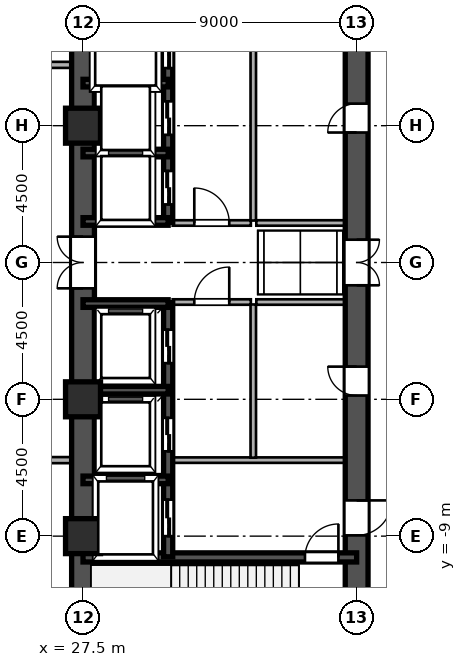
"""IFC4 building model, lengths in metres.
Left out: names, types, materials, properties, quantities, classifications, styles, units other than length and angle.
Written with IfcOpenShell. Run it as: python <this file> out.ifc"""

import sys

from ifc_helpers import new_model, si_unit, direction, frame, frame_2d, origin, origin_2d, place, context, subcontext, project, spatial, rectangle, hollow_rectangle, extrude, source, transform, mapped, element, fill, save


model = new_model("IFC4")
c1 = context("Model", 3, precision=1e-05, world=origin(), true_north=direction((0.0, 1.0)))
c2 = subcontext(c1, "Body", "Model", "MODEL_VIEW")
j1 = project(units=[si_unit("LENGTHUNIT", "METRE"), si_unit("PLANEANGLEUNIT", "RADIAN")], contexts=[c1])
p1 = place(None, origin())
s1 = spatial("IfcSite", under=j1, at=p1, CompositionType="ELEMENT")
p2 = place(p1, origin())
s2 = spatial("IfcBuilding", under=s1, at=p2, CompositionType="ELEMENT")
p3 = place(p2, origin())
s3 = spatial("IfcBuildingStorey", under=s2, at=p3, CompositionType="ELEMENT", Elevation=0.0)
m1 = source(origin(), c2, "Body", "SweptSolid", [
    extrude(hollow_rectangle(XDim=1.15, YDim=1.15, WallThickness=0.048, at=origin_2d()), origin(), (0.0, 0.0, 1.0), 5.4),
])
for number, where, z_axis, x_axis in (
    (1, (27.5, -9.0, 0.0), (0.0, 0.0, 1.0), (1.0, 0.0, 0.0)),
    (2, (27.5, -4.5, 0.0), (0.0, 0.0, 1.0), (1.0, 0.0, 0.0)),
    (3, (27.5, 4.5, 0.0), (0.0, 0.0, 1.0), (1.0, 0.0, 0.0)),
):
    element("IfcColumn", number, at=place(p3, frame(where, z_axis=z_axis, x_axis=x_axis)), inside=s3, PredefinedType="COLUMN", context=c2, shape_type="MappedRepresentation", body=[
        mapped(m1, transform((0.0, 0.0, 0.0), scale=1.0)),
    ])
for number, where, z_axis, x_axis in (
    (4, (27.5, -13.5, 0.0), (0.0, 0.0, 1.0), (0.0, 1.0, 0.0)),
    (5, (27.5, 1.3, 0.0), (0.0, 0.0, 1.0), (0.0, 1.0, 0.0)),
):
    element("IfcWall", number, at=place(p3, frame(where, z_axis=z_axis, x_axis=x_axis)), inside=s3, PredefinedType="SHEAR", context=c2, shape_type="SweptSolid", body=[
        extrude(rectangle(XDim=12.2, YDim=0.75, at=frame_2d((6.1, 0.0))), origin(), (0.0, 0.0, 1.0), 5.12),
    ])
p4 = place(p3, frame((27.5, -1.3, 0.0), z_axis=(0.0, 0.0, 1.0), x_axis=(0.0, 1.0, 0.0)))
e6 = element("IfcWall", 6, at=p4, inside=s3, PredefinedType="SHEAR", context=c2, shape_type="SweptSolid", body=[
    extrude(rectangle(XDim=2.6, YDim=0.75, at=frame_2d((1.3, 0.0))), origin(), (0.0, 0.0, 1.0), 5.12),
])
p5 = place(p4, frame((0.45, 0.0, 0.0)))
e7 = element("IfcOpeningElement", 7, at=p5, cuts=e6, PredefinedType="OPENING", context=c2, shape_type="SweptSolid", body=[
    extrude(rectangle(XDim=1.7, YDim=2.35, at=frame_2d((0.85, 1.175))), frame((0.0, 0.385, 0.0), z_axis=(0.0, -1.0, 0.0), x_axis=(1.0, 0.0, 0.0)), (0.0, 0.0, 1.0), 0.77),
])
p6 = place(p3, frame((36.5, -13.65, 0.0), z_axis=(0.0, 0.0, 1.0), x_axis=(0.0, 1.0, 0.0)))
e8 = element("IfcWall", 8, at=p6, inside=s3, PredefinedType="SHEAR", context=c2, shape_type="SweptSolid", body=[
    extrude(rectangle(XDim=7.15, YDim=0.75, at=frame_2d((3.575, 0.0))), origin(), (0.0, 0.0, 1.0), 5.12),
])
p7 = place(p6, frame((4.675, 0.0, 0.0)))
e9 = element("IfcOpeningElement", 9, at=p7, cuts=e8, PredefinedType="OPENING", context=c2, shape_type="SweptSolid", body=[
    extrude(rectangle(XDim=1.15, YDim=2.2, at=frame_2d((0.575, 1.1))), frame((0.0, 0.385, 0.0), z_axis=(0.0, -1.0, 0.0), x_axis=(1.0, 0.0, 0.0)), (0.0, 0.0, 1.0), 0.77),
])
p8 = place(p3, frame((36.5, -1.3, 0.0), z_axis=(0.0, 0.0, 1.0), x_axis=(0.0, 1.0, 0.0)))
e10 = element("IfcWall", 10, at=p8, inside=s3, PredefinedType="SHEAR", context=c2, shape_type="SweptSolid", body=[
    extrude(rectangle(XDim=2.6, YDim=0.75, at=frame_2d((1.3, 0.0))), origin(), (0.0, 0.0, 1.0), 5.12),
])
p9 = place(p8, frame((0.55, 0.0, 0.0)))
e11 = element("IfcOpeningElement", 11, at=p9, cuts=e10, PredefinedType="OPENING", context=c2, shape_type="SweptSolid", body=[
    extrude(rectangle(XDim=1.5, YDim=2.3, at=frame_2d((0.75, 1.15))), frame((0.0, 0.385, 0.0), z_axis=(0.0, -1.0, 0.0), x_axis=(1.0, 0.0, 0.0)), (0.0, 0.0, 1.0), 0.77),
])
p10 = place(p3, frame((36.5, -6.5, 0.0), z_axis=(0.0, 0.0, 1.0), x_axis=(0.0, 1.0, 0.0)))
e12 = element("IfcWall", 12, at=p10, inside=s3, PredefinedType="SHEAR", context=c2, shape_type="SweptSolid", body=[
    extrude(rectangle(XDim=5.2, YDim=0.75, at=frame_2d((2.6, 0.0))), origin(), (0.0, 0.0, 1.0), 5.12),
])
p11 = place(p10, frame((2.125, 0.0, 0.0)))
e13 = element("IfcOpeningElement", 13, at=p11, cuts=e12, PredefinedType="OPENING", context=c2, shape_type="SweptSolid", body=[
    extrude(rectangle(XDim=0.95, YDim=2.15, at=frame_2d((0.475, 1.075))), frame((0.0, 0.385, 0.0), z_axis=(0.0, -1.0, 0.0), x_axis=(1.0, 0.0, 0.0)), (0.0, 0.0, 1.0), 0.77),
])
p12 = place(p3, frame((36.5, 1.3, 0.0), z_axis=(0.0, 0.0, 1.0), x_axis=(0.0, 1.0, 0.0)))
e14 = element("IfcWall", 14, at=p12, inside=s3, PredefinedType="SHEAR", context=c2, shape_type="SweptSolid", body=[
    extrude(rectangle(XDim=6.9, YDim=0.75, at=frame_2d((3.45, 0.0))), origin(), (0.0, 0.0, 1.0), 5.12),
])
p13 = place(p12, frame((2.975, 0.0, 0.0)))
e15 = element("IfcOpeningElement", 15, at=p13, cuts=e14, PredefinedType="OPENING", context=c2, shape_type="SweptSolid", body=[
    extrude(rectangle(XDim=0.95, YDim=2.15, at=frame_2d((0.475, 1.075))), frame((0.0, 0.385, 0.0), z_axis=(0.0, -1.0, 0.0), x_axis=(1.0, 0.0, 0.0)), (0.0, 0.0, 1.0), 0.77),
])
p14 = place(p3, frame((27.5, -9.7, 0.0), z_axis=(0.0, 0.0, 1.0), x_axis=(1.0, 0.0, 0.0)))
e16 = element("IfcWall", 16, at=p14, inside=s3, PredefinedType="SHEAR", context=c2, shape_type="SweptSolid", body=[
    extrude(rectangle(XDim=9.0, YDim=0.3, at=frame_2d((4.5, 0.0))), origin(), (0.0, 0.0, 1.0), 5.12),
])
p15 = place(p14, frame((7.3, 0.0, 0.0)))
e17 = element("IfcOpeningElement", 17, at=p15, cuts=e16, PredefinedType="OPENING", context=c2, shape_type="SweptSolid", body=[
    extrude(rectangle(XDim=1.1, YDim=2.2, at=frame_2d((0.55, 1.1))), frame((0.0, 0.16, 0.0), z_axis=(0.0, -1.0, 0.0), x_axis=(1.0, 0.0, 0.0)), (0.0, 0.0, 1.0), 0.32),
])
for number, where, z_axis, x_axis in (
    (18, (27.5, -7.15, 0.0), (0.0, 0.0, 1.0), (1.0, 0.0, 0.0)),
    (19, (27.5, -4.2, 0.0), (0.0, 0.0, 1.0), (1.0, 0.0, 0.0)),
    (20, (27.5, -1.35, 0.0), (0.0, 0.0, 1.0), (1.0, 0.0, 0.0)),
    (21, (27.5, 1.35, 0.0), (0.0, 0.0, 1.0), (1.0, 0.0, 0.0)),
    (22, (27.5, 3.6, 0.0), (0.0, 0.0, 1.0), (1.0, 0.0, 0.0)),
    (23, (27.5, 5.9, 0.0), (0.0, 0.0, 1.0), (1.0, 0.0, 0.0)),
):
    element("IfcWall", number, at=place(p3, frame(where, z_axis=z_axis, x_axis=x_axis)), inside=s3, PredefinedType="SHEAR", context=c2, shape_type="SweptSolid", body=[
        extrude(rectangle(XDim=2.8, YDim=0.25, at=frame_2d((1.4, 0.0))), origin(), (0.0, 0.0, 1.0), 5.12),
    ])
p16 = place(p3, frame((30.3, -9.68, 0.0), z_axis=(0.0, 0.0, 1.0), x_axis=(0.0, 1.0, 0.0)))
e24 = element("IfcWall", 24, at=p16, inside=s3, PredefinedType="SHEAR", context=c2, shape_type="SweptSolid", body=[
    extrude(rectangle(XDim=2.56, YDim=0.3, at=frame_2d((1.28, 0.0))), origin(), (0.0, 0.0, 1.0), 5.12),
])
p17 = place(p16, frame((0.68, 0.0, 0.0)))
e25 = element("IfcOpeningElement", 25, at=p17, cuts=e24, PredefinedType="OPENING", context=c2, shape_type="SweptSolid", body=[
    extrude(rectangle(XDim=1.2, YDim=2.25, at=frame_2d((0.6, 1.125))), frame((0.0, 0.16, 0.0), z_axis=(0.0, -1.0, 0.0), x_axis=(1.0, 0.0, 0.0)), (0.0, 0.0, 1.0), 0.32),
])
p18 = place(p3, frame((30.3, -7.12, 0.0), z_axis=(0.0, 0.0, 1.0), x_axis=(0.0, 1.0, 0.0)))
e26 = element("IfcWall", 26, at=p18, inside=s3, PredefinedType="SHEAR", context=c2, shape_type="SweptSolid", body=[
    extrude(rectangle(XDim=2.92, YDim=0.3, at=frame_2d((1.46, 0.0))), origin(), (0.0, 0.0, 1.0), 5.12),
])
p19 = place(p18, frame((0.91, 0.0, 0.0)))
e27 = element("IfcOpeningElement", 27, at=p19, cuts=e26, PredefinedType="OPENING", context=c2, shape_type="SweptSolid", body=[
    extrude(rectangle(XDim=1.1, YDim=2.2, at=frame_2d((0.55, 1.1))), frame((0.0, 0.16, 0.0), z_axis=(0.0, -1.0, 0.0), x_axis=(1.0, 0.0, 0.0)), (0.0, 0.0, 1.0), 0.32),
])
p20 = place(p3, frame((30.3, -4.2, 0.0), z_axis=(0.0, 0.0, 1.0), x_axis=(0.0, 1.0, 0.0)))
e28 = element("IfcWall", 28, at=p20, inside=s3, PredefinedType="SHEAR", context=c2, shape_type="SweptSolid", body=[
    extrude(rectangle(XDim=2.88, YDim=0.3, at=frame_2d((1.44, 0.0))), origin(), (0.0, 0.0, 1.0), 5.12),
])
p21 = place(p20, frame((0.89, 0.0, 0.0)))
e29 = element("IfcOpeningElement", 29, at=p21, cuts=e28, PredefinedType="OPENING", context=c2, shape_type="SweptSolid", body=[
    extrude(rectangle(XDim=1.1, YDim=2.2, at=frame_2d((0.55, 1.1))), frame((0.0, 0.16, 0.0), z_axis=(0.0, -1.0, 0.0), x_axis=(1.0, 0.0, 0.0)), (0.0, 0.0, 1.0), 0.32),
])
p22 = place(p3, frame((30.3, 1.32, 0.0), z_axis=(0.0, 0.0, 1.0), x_axis=(0.0, 1.0, 0.0)))
e30 = element("IfcWall", 30, at=p22, inside=s3, PredefinedType="SHEAR", context=c2, shape_type="SweptSolid", body=[
    extrude(rectangle(XDim=2.28, YDim=0.3, at=frame_2d((1.14, 0.0))), origin(), (0.0, 0.0, 1.0), 5.12),
])
p23 = place(p22, frame((0.59, 0.0, 0.0)))
e31 = element("IfcOpeningElement", 31, at=p23, cuts=e30, PredefinedType="OPENING", context=c2, shape_type="SweptSolid", body=[
    extrude(rectangle(XDim=1.1, YDim=2.2, at=frame_2d((0.55, 1.1))), frame((0.0, 0.16, 0.0), z_axis=(0.0, -1.0, 0.0), x_axis=(1.0, 0.0, 0.0)), (0.0, 0.0, 1.0), 0.32),
])
p24 = place(p3, frame((30.3, 3.6, 0.0), z_axis=(0.0, 0.0, 1.0), x_axis=(0.0, 1.0, 0.0)))
e32 = element("IfcWall", 32, at=p24, inside=s3, PredefinedType="SHEAR", context=c2, shape_type="SweptSolid", body=[
    extrude(rectangle(XDim=2.3, YDim=0.3, at=frame_2d((1.15, 0.0))), origin(), (0.0, 0.0, 1.0), 5.12),
])
p25 = place(p24, frame((0.6, 0.0, 0.0)))
e33 = element("IfcOpeningElement", 33, at=p25, cuts=e32, PredefinedType="OPENING", context=c2, shape_type="SweptSolid", body=[
    extrude(rectangle(XDim=1.1, YDim=2.2, at=frame_2d((0.55, 1.1))), frame((0.0, 0.16, 0.0), z_axis=(0.0, -1.0, 0.0), x_axis=(1.0, 0.0, 0.0)), (0.0, 0.0, 1.0), 0.32),
])
p26 = place(p3, frame((30.3, 5.9, 0.0), z_axis=(0.0, 0.0, 1.0), x_axis=(0.0, 1.0, 0.0)))
e34 = element("IfcWall", 34, at=p26, inside=s3, PredefinedType="SHEAR", context=c2, shape_type="SweptSolid", body=[
    extrude(rectangle(XDim=2.25, YDim=0.3, at=frame_2d((1.125, 0.0))), origin(), (0.0, 0.0, 1.0), 5.12),
])
p27 = place(p26, frame((0.495, 0.0, 0.0)))
e35 = element("IfcOpeningElement", 35, at=p27, cuts=e34, PredefinedType="OPENING", context=c2, shape_type="SweptSolid", body=[
    extrude(rectangle(XDim=1.25, YDim=2.3, at=frame_2d((0.625, 1.15))), frame((0.0, 0.16, 0.0), z_axis=(0.0, -1.0, 0.0), x_axis=(1.0, 0.0, 0.0)), (0.0, 0.0, 1.0), 0.32),
])
p28 = place(p3, frame((30.45, -6.5, 0.0), z_axis=(0.0, 0.0, 1.0), x_axis=(1.0, 0.0, 0.0)))
e36 = element("IfcWall", 36, at=p28, inside=s3, PredefinedType="PARTITIONING", context=c2, shape_type="SweptSolid", body=[
    extrude(rectangle(XDim=5.7, YDim=0.18, at=frame_2d((2.85, 0.0))), origin(), (0.0, 0.0, 1.0), 5.12),
])
p29 = place(p3, frame((33.1, -6.42, 0.0), z_axis=(0.0, 0.0, 1.0), x_axis=(0.0, 1.0, 0.0)))
e37 = element("IfcWall", 37, at=p29, inside=s3, PredefinedType="PARTITIONING", context=c2, shape_type="SweptSolid", body=[
    extrude(rectangle(XDim=5.04, YDim=0.18, at=frame_2d((2.52, 0.0))), origin(), (0.0, 0.0, 1.0), 5.12),
])
p30 = place(p3, frame((33.1, 1.38, 0.0), z_axis=(0.0, 0.0, 1.0), x_axis=(0.0, 1.0, 0.0)))
e38 = element("IfcWall", 38, at=p30, inside=s3, PredefinedType="PARTITIONING", context=c2, shape_type="SweptSolid", body=[
    extrude(rectangle(XDim=6.74, YDim=0.18, at=frame_2d((3.37, 0.0))), origin(), (0.0, 0.0, 1.0), 5.12),
])
p31 = place(p3, frame((30.45, -1.3, 0.0), z_axis=(0.0, 0.0, 1.0), x_axis=(1.0, 0.0, 0.0)))
e39 = element("IfcWall", 39, at=p31, inside=s3, PredefinedType="PARTITIONING", context=c2, shape_type="SweptSolid", body=[
    extrude(rectangle(XDim=2.57, YDim=0.18, at=frame_2d((1.285, 0.0))), origin(), (0.0, 0.0, 1.0), 5.12),
])
p32 = place(p31, frame((0.71, 0.0, 0.0)))
e40 = element("IfcOpeningElement", 40, at=p32, cuts=e39, PredefinedType="OPENING", context=c2, shape_type="SweptSolid", body=[
    extrude(rectangle(XDim=1.15, YDim=2.2, at=frame_2d((0.575, 1.1))), frame((0.0, 0.1, 0.0), z_axis=(0.0, -1.0, 0.0), x_axis=(1.0, 0.0, 0.0)), (0.0, 0.0, 1.0), 0.2),
])
p33 = place(p3, frame((30.45, 1.3, 0.0), z_axis=(0.0, 0.0, 1.0), x_axis=(1.0, 0.0, 0.0)))
e41 = element("IfcWall", 41, at=p33, inside=s3, PredefinedType="PARTITIONING", context=c2, shape_type="SweptSolid", body=[
    extrude(rectangle(XDim=2.57, YDim=0.18, at=frame_2d((1.285, 0.0))), origin(), (0.0, 0.0, 1.0), 5.12),
])
p34 = place(p33, frame((0.71, 0.0, 0.0)))
e42 = element("IfcOpeningElement", 42, at=p34, cuts=e41, PredefinedType="OPENING", context=c2, shape_type="SweptSolid", body=[
    extrude(rectangle(XDim=1.15, YDim=2.2, at=frame_2d((0.575, 1.1))), frame((0.0, 0.1, 0.0), z_axis=(0.0, -1.0, 0.0), x_axis=(1.0, 0.0, 0.0)), (0.0, 0.0, 1.0), 0.2),
])
for number, where, z_axis, x_axis in (
    (43, (33.2, -1.3, 0.0), (0.0, 0.0, 1.0), (1.0, 0.0, 0.0)),
    (44, (33.2, 1.3, 0.0), (0.0, 0.0, 1.0), (1.0, 0.0, 0.0)),
):
    element("IfcWall", number, at=place(p3, frame(where, z_axis=z_axis, x_axis=x_axis)), inside=s3, PredefinedType="PARTITIONING", context=c2, shape_type="SweptSolid", body=[
        extrude(rectangle(XDim=2.95, YDim=0.18, at=frame_2d((1.475, 0.0))), origin(), (0.0, 0.0, 1.0), 5.12),
    ])
p35 = place(p3, frame((-27.12, -6.5, 0.0), z_axis=(0.0, 0.0, 1.0), x_axis=(1.0, 0.0, 0.0)))
e45 = element("IfcWall", 45, at=p35, inside=s3, PredefinedType="PARTITIONING", context=c2, shape_type="SweptSolid", body=[
    extrude(rectangle(XDim=54.24, YDim=0.2, at=frame_2d((27.12, 0.0))), origin(), (0.0, 0.0, 1.0), 5.12),
])
p36 = place(p35, frame((5.145, 0.0, 0.0)))
e46 = element("IfcOpeningElement", 46, at=p36, cuts=e45, PredefinedType="OPENING", context=c2, shape_type="SweptSolid", body=[
    extrude(rectangle(XDim=0.95, YDim=2.15, at=frame_2d((0.475, 1.075))), frame((0.0, 0.11, 0.0), z_axis=(0.0, -1.0, 0.0), x_axis=(1.0, 0.0, 0.0)), (0.0, 0.0, 1.0), 0.22),
])
p37 = place(p35, frame((37.645, 0.0, 0.0)))
e47 = element("IfcOpeningElement", 47, at=p37, cuts=e45, PredefinedType="OPENING", context=c2, shape_type="SweptSolid", body=[
    extrude(rectangle(XDim=0.95, YDim=2.15, at=frame_2d((0.475, 1.075))), frame((0.0, 0.11, 0.0), z_axis=(0.0, -1.0, 0.0), x_axis=(1.0, 0.0, 0.0)), (0.0, 0.0, 1.0), 0.22),
])
p38 = place(p3, frame((-27.12, 6.5, 0.0), z_axis=(0.0, 0.0, 1.0), x_axis=(1.0, 0.0, 0.0)))
e48 = element("IfcWall", 48, at=p38, inside=s3, PredefinedType="PARTITIONING", context=c2, shape_type="SweptSolid", body=[
    extrude(rectangle(XDim=54.24, YDim=0.2, at=frame_2d((27.12, 0.0))), origin(), (0.0, 0.0, 1.0), 5.12),
])
p39 = place(p38, frame((4.045, 0.0, 0.0)))
e49 = element("IfcOpeningElement", 49, at=p39, cuts=e48, PredefinedType="OPENING", context=c2, shape_type="SweptSolid", body=[
    extrude(rectangle(XDim=1.15, YDim=2.2, at=frame_2d((0.575, 1.1))), frame((0.0, 0.11, 0.0), z_axis=(0.0, -1.0, 0.0), x_axis=(1.0, 0.0, 0.0)), (0.0, 0.0, 1.0), 0.22),
])
p40 = place(p38, frame((17.395, 0.0, 0.0)))
e50 = element("IfcOpeningElement", 50, at=p40, cuts=e48, PredefinedType="OPENING", context=c2, shape_type="SweptSolid", body=[
    extrude(rectangle(XDim=0.95, YDim=2.15, at=frame_2d((0.475, 1.075))), frame((0.0, 0.11, 0.0), z_axis=(0.0, -1.0, 0.0), x_axis=(1.0, 0.0, 0.0)), (0.0, 0.0, 1.0), 0.22),
])
p41 = place(p38, frame((47.33, 0.0, 0.0)))
e51 = element("IfcOpeningElement", 51, at=p41, cuts=e48, PredefinedType="OPENING", context=c2, shape_type="SweptSolid", body=[
    extrude(rectangle(XDim=0.88, YDim=2.1, at=frame_2d((0.44, 1.05))), frame((0.0, 0.11, 0.0), z_axis=(0.0, -1.0, 0.0), x_axis=(1.0, 0.0, 0.0)), (0.0, 0.0, 1.0), 0.22),
])
p42 = place(p38, frame((51.68, 0.0, 0.0)))
e52 = element("IfcOpeningElement", 52, at=p42, cuts=e48, PredefinedType="OPENING", context=c2, shape_type="SweptSolid", body=[
    extrude(rectangle(XDim=0.88, YDim=2.1, at=frame_2d((0.44, 1.05))), frame((0.0, 0.11, 0.0), z_axis=(0.0, -1.0, 0.0), x_axis=(1.0, 0.0, 0.0)), (0.0, 0.0, 1.0), 0.22),
])
m2 = source(origin(), c2, "Body", "SweptSolid", [
    extrude(rectangle(XDim=1.7, YDim=2.35, at=frame_2d((0.85, 1.175))), frame((0.0, 0.025, 0.0), z_axis=(0.0, -1.0, 0.0), x_axis=(1.0, 0.0, 0.0)), (0.0, 0.0, 1.0), 0.05),
])
p43 = place(p5, origin())
e53 = element("IfcDoor", 53, at=p43, inside=s3, OperationType="DOUBLE_SWING_LEFT", PredefinedType="DOOR", context=c2, shape_type="MappedRepresentation", body=[
    mapped(m2, transform((0.0, 0.0, 0.0), scale=1.0)),
])
fill(e7, e53)
m3 = source(origin(), c2, "Body", "SweptSolid", [
    extrude(rectangle(XDim=1.15, YDim=2.2, at=frame_2d((0.575, 1.1))), frame((0.0, 0.025, 0.0), z_axis=(0.0, -1.0, 0.0), x_axis=(1.0, 0.0, 0.0)), (0.0, 0.0, 1.0), 0.05),
])
p44 = place(p7, frame((1.15, 0.0, 0.0), z_axis=(0.0, 0.0, 1.0), x_axis=(-1.0, 0.0, 0.0)))
e54 = element("IfcDoor", 54, at=p44, inside=s3, OperationType="SINGLE_SWING_RIGHT", PredefinedType="DOOR", context=c2, shape_type="MappedRepresentation", body=[
    mapped(m3, transform((0.0, 0.0, 0.0), scale=1.0)),
])
fill(e9, e54)
m4 = source(origin(), c2, "Body", "SweptSolid", [
    extrude(rectangle(XDim=1.5, YDim=2.3, at=frame_2d((0.75, 1.15))), frame((0.0, 0.025, 0.0), z_axis=(0.0, -1.0, 0.0), x_axis=(1.0, 0.0, 0.0)), (0.0, 0.0, 1.0), 0.05),
])
p45 = place(p9, frame((1.5, 0.0, 0.0), z_axis=(0.0, 0.0, 1.0), x_axis=(-1.0, 0.0, 0.0)))
e55 = element("IfcDoor", 55, at=p45, inside=s3, OperationType="DOUBLE_SWING_LEFT", PredefinedType="DOOR", context=c2, shape_type="MappedRepresentation", body=[
    mapped(m4, transform((0.0, 0.0, 0.0), scale=1.0)),
])
fill(e11, e55)
m5 = source(origin(), c2, "Body", "SweptSolid", [
    extrude(rectangle(XDim=0.95, YDim=2.15, at=frame_2d((0.475, 1.075))), frame((0.0, 0.025, 0.0), z_axis=(0.0, -1.0, 0.0), x_axis=(1.0, 0.0, 0.0)), (0.0, 0.0, 1.0), 0.05),
])
p46 = place(p11, origin())
e56 = element("IfcDoor", 56, at=p46, inside=s3, OperationType="SINGLE_SWING_RIGHT", PredefinedType="DOOR", context=c2, shape_type="MappedRepresentation", body=[
    mapped(m5, transform((0.0, 0.0, 0.0), scale=1.0)),
])
fill(e13, e56)
p47 = place(p13, origin())
e57 = element("IfcDoor", 57, at=p47, inside=s3, OperationType="SINGLE_SWING_LEFT", PredefinedType="DOOR", context=c2, shape_type="MappedRepresentation", body=[
    mapped(m5, transform((0.0, 0.0, 0.0), scale=1.0)),
])
fill(e15, e57)
m6 = source(origin(), c2, "Body", "SweptSolid", [
    extrude(rectangle(XDim=1.1, YDim=2.2, at=frame_2d((0.55, 1.1))), frame((0.0, 0.025, 0.0), z_axis=(0.0, -1.0, 0.0), x_axis=(1.0, 0.0, 0.0)), (0.0, 0.0, 1.0), 0.05),
])
p48 = place(p15, origin())
e58 = element("IfcDoor", 58, at=p48, inside=s3, OperationType="SINGLE_SWING_RIGHT", PredefinedType="DOOR", context=c2, shape_type="MappedRepresentation", body=[
    mapped(m6, transform((0.0, 0.0, 0.0), scale=1.0)),
])
fill(e17, e58)
m7 = source(origin(), c2, "Body", "SweptSolid", [
    extrude(rectangle(XDim=1.2, YDim=2.25, at=frame_2d((0.6, 1.125))), frame((0.0, 0.025, 0.0), z_axis=(0.0, -1.0, 0.0), x_axis=(1.0, 0.0, 0.0)), (0.0, 0.0, 1.0), 0.05),
])
p49 = place(p17, origin())
e59 = element("IfcDoor", 59, at=p49, inside=s3, OperationType="DOUBLE_DOOR_SLIDING", PredefinedType="DOOR", context=c2, shape_type="MappedRepresentation", body=[
    mapped(m7, transform((0.0, 0.0, 0.0), scale=1.0)),
])
fill(e25, e59)
m8 = source(origin(), c2, "Body", "SweptSolid", [
    extrude(rectangle(XDim=1.1, YDim=2.2, at=frame_2d((0.55, 1.1))), frame((0.0, 0.025, 0.0), z_axis=(0.0, -1.0, 0.0), x_axis=(1.0, 0.0, 0.0)), (0.0, 0.0, 1.0), 0.05),
])
p50 = place(p19, origin())
e60 = element("IfcDoor", 60, at=p50, inside=s3, OperationType="DOUBLE_DOOR_SLIDING", PredefinedType="DOOR", context=c2, shape_type="MappedRepresentation", body=[
    mapped(m8, transform((0.0, 0.0, 0.0), scale=1.0)),
])
fill(e27, e60)
p51 = place(p21, origin())
e61 = element("IfcDoor", 61, at=p51, inside=s3, OperationType="DOUBLE_DOOR_SLIDING", PredefinedType="DOOR", context=c2, shape_type="MappedRepresentation", body=[
    mapped(m8, transform((0.0, 0.0, 0.0), scale=1.0)),
])
fill(e29, e61)
p52 = place(p23, origin())
e62 = element("IfcDoor", 62, at=p52, inside=s3, OperationType="DOUBLE_DOOR_SLIDING", PredefinedType="DOOR", context=c2, shape_type="MappedRepresentation", body=[
    mapped(m8, transform((0.0, 0.0, 0.0), scale=1.0)),
])
fill(e31, e62)
p53 = place(p25, origin())
e63 = element("IfcDoor", 63, at=p53, inside=s3, OperationType="DOUBLE_DOOR_SLIDING", PredefinedType="DOOR", context=c2, shape_type="MappedRepresentation", body=[
    mapped(m8, transform((0.0, 0.0, 0.0), scale=1.0)),
])
fill(e33, e63)
m9 = source(origin(), c2, "Body", "SweptSolid", [
    extrude(rectangle(XDim=1.25, YDim=2.3, at=frame_2d((0.625, 1.15))), frame((0.0, 0.025, 0.0), z_axis=(0.0, -1.0, 0.0), x_axis=(1.0, 0.0, 0.0)), (0.0, 0.0, 1.0), 0.05),
])
p54 = place(p27, origin())
e64 = element("IfcDoor", 64, at=p54, inside=s3, OperationType="DOUBLE_DOOR_SLIDING", PredefinedType="DOOR", context=c2, shape_type="MappedRepresentation", body=[
    mapped(m9, transform((0.0, 0.0, 0.0), scale=1.0)),
])
fill(e35, e64)
p55 = place(p32, origin())
e65 = element("IfcDoor", 65, at=p55, inside=s3, OperationType="SINGLE_SWING_RIGHT", PredefinedType="DOOR", context=c2, shape_type="MappedRepresentation", body=[
    mapped(m3, transform((0.0, 0.0, 0.0), scale=1.0)),
])
fill(e40, e65)
p56 = place(p34, origin())
e66 = element("IfcDoor", 66, at=p56, inside=s3, OperationType="SINGLE_SWING_LEFT", PredefinedType="DOOR", context=c2, shape_type="MappedRepresentation", body=[
    mapped(m3, transform((0.0, 0.0, 0.0), scale=1.0)),
])
fill(e42, e66)
save(model, sys.argv[1])
